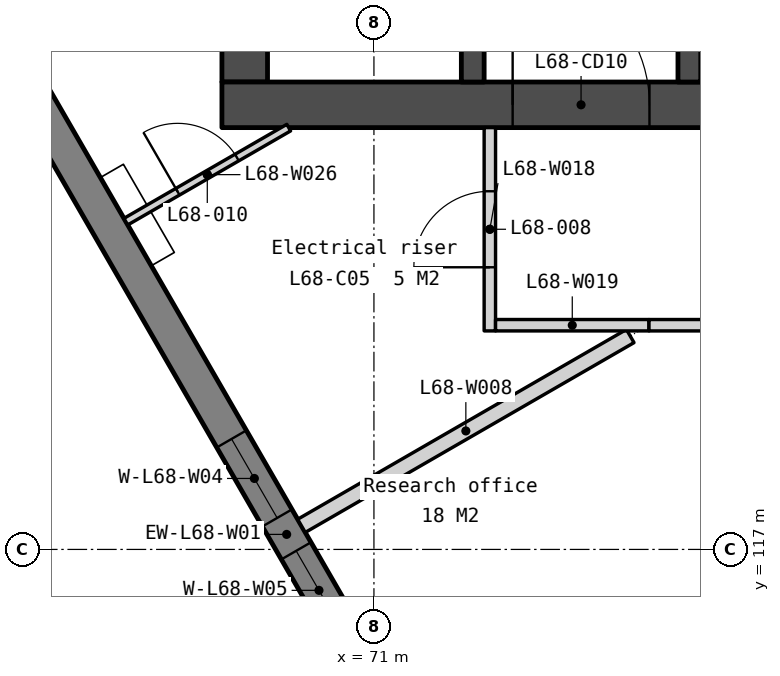
"""IFC4 building model, lengths in metres.
Left out: names, types, materials, properties, quantities, classifications, styles, units other than length and angle.
Written with IfcOpenShell. Run it as: python <this file> out.ifc"""

import sys

from ifc_helpers import new_model, si_unit, direction, frame, frame_2d, origin, place, context, subcontext, project, spatial, polyline, rectangle, outline, extrude, element, fill, save


model = new_model("IFC4")
c1 = context("Model", 3, precision=1e-05, world=origin(), true_north=direction((0.0, 1.0)))
c2 = subcontext(c1, "Body", "Model", "MODEL_VIEW")
j1 = project(units=[si_unit("LENGTHUNIT", "METRE"), si_unit("PLANEANGLEUNIT", "RADIAN")], contexts=[c1])
p1 = place(None, origin())
s1 = spatial("IfcSite", under=j1, at=p1, CompositionType="ELEMENT")
p2 = place(p1, origin())
s2 = spatial("IfcBuilding", under=s1, at=p2, CompositionType="ELEMENT")
p3 = place(p2, frame((0.0, 0.0, 277.7)))
s3 = spatial("IfcBuildingStorey", under=s2, at=p3, CompositionType="ELEMENT", Elevation=277.7)
p4 = place(p3, frame((69.3, 133.95, 0.0), z_axis=(0.0, 0.0, 1.0), x_axis=(0.0, -1.0, 0.0)))
e1 = element("IfcWall", 1, at=p4, inside=s3, PredefinedType="SOLIDWALL", context=c2, shape_type="SweptSolid", body=[
    extrude(rectangle(XDim=10.8, YDim=0.6, at=frame_2d((5.4, 0.0))), origin(), (0.0, 0.0, 1.0), 3.75),
])
p5 = place(p3, frame((69.0, 122.85, 0.0), z_axis=(0.0, 0.0, 1.0), x_axis=(1.0, 0.0, 0.0)))
e2 = element("IfcWall", 2, at=p5, inside=s3, PredefinedType="SOLIDWALL", context=c2, shape_type="SweptSolid", body=[
    extrude(rectangle(XDim=22.0, YDim=0.6, at=frame_2d((11.0, 0.0))), origin(), (0.0, 0.0, 1.0), 3.75),
])
p6 = place(p5, frame((16.375, 0.0, 0.0)))
e3 = element("IfcOpeningElement", 3, at=p6, cuts=e2, PredefinedType="OPENING", context=c2, shape_type="SweptSolid", body=[
    extrude(rectangle(XDim=1.8, YDim=2.1, at=frame_2d((0.9, 1.05))), frame((0.0, 0.31, 0.0), z_axis=(0.0, -1.0, 0.0), x_axis=(1.0, 0.0, 0.0)), (0.0, 0.0, 1.0), 0.62),
])
p7 = place(p5, frame((3.825, 0.0, 0.0)))
e4 = element("IfcOpeningElement", 4, at=p7, cuts=e2, PredefinedType="OPENING", context=c2, shape_type="SweptSolid", body=[
    extrude(rectangle(XDim=1.8, YDim=2.1, at=frame_2d((0.9, 1.05))), frame((0.0, 0.31, 0.0), z_axis=(0.0, -1.0, 0.0), x_axis=(1.0, 0.0, 0.0)), (0.0, 0.0, 1.0), 0.62),
])
p8 = place(p5, frame((12.85, 0.0, 0.0)))
e5 = element("IfcOpeningElement", 5, at=p8, cuts=e2, PredefinedType="OPENING", context=c2, shape_type="SweptSolid", body=[
    extrude(rectangle(XDim=1.5, YDim=2.1, at=frame_2d((0.75, 1.05))), frame((0.0, 0.31, 0.0), z_axis=(0.0, -1.0, 0.0), x_axis=(1.0, 0.0, 0.0)), (0.0, 0.0, 1.0), 0.62),
])
p9 = place(p3, frame((72.3, 133.95, 0.0), z_axis=(0.0, 0.0, 1.0), x_axis=(0.0, -1.0, 0.0)))
e6 = element("IfcWall", 6, at=p9, inside=s3, PredefinedType="SOLIDWALL", context=c2, shape_type="SweptSolid", body=[
    extrude(rectangle(XDim=10.8, YDim=0.3, at=frame_2d((5.4, 0.0))), origin(), (0.0, 0.0, 1.0), 3.75),
])
p10 = place(p9, frame((6.95, 0.0, 0.0)))
e7 = element("IfcOpeningElement", 7, at=p10, cuts=e6, PredefinedType="OPENING", context=c2, shape_type="SweptSolid", body=[
    extrude(rectangle(XDim=1.1, YDim=2.1, at=frame_2d((0.55, 1.05))), frame((0.0, 0.16, 0.0), z_axis=(0.0, -1.0, 0.0), x_axis=(1.0, 0.0, 0.0)), (0.0, 0.0, 1.0), 0.32),
])
p11 = place(p9, frame((9.35, 0.0, 0.0)))
e8 = element("IfcOpeningElement", 8, at=p11, cuts=e6, PredefinedType="OPENING", context=c2, shape_type="SweptSolid", body=[
    extrude(rectangle(XDim=0.9, YDim=2.1, at=frame_2d((0.45, 1.05))), frame((0.0, 0.16, 0.0), z_axis=(0.0, -1.0, 0.0), x_axis=(1.0, 0.0, 0.0)), (0.0, 0.0, 1.0), 0.32),
])
p12 = place(p9, frame((5.1, 0.0, 0.0)))
e9 = element("IfcOpeningElement", 9, at=p12, cuts=e6, PredefinedType="OPENING", context=c2, shape_type="SweptSolid", body=[
    extrude(rectangle(XDim=1.0, YDim=2.1, at=frame_2d((0.5, 1.05))), frame((0.0, 0.16, 0.0), z_axis=(0.0, -1.0, 0.0), x_axis=(1.0, 0.0, 0.0)), (0.0, 0.0, 1.0), 0.32),
])
p13 = place(p3, frame((75.15, 125.7, 0.0), z_axis=(0.0, 0.0, 1.0), x_axis=(0.0, -1.0, 0.0)))
e10 = element("IfcWall", 10, at=p13, inside=s3, PredefinedType="SOLIDWALL", context=c2, shape_type="SweptSolid", body=[
    extrude(rectangle(XDim=2.55, YDim=0.3, at=frame_2d((1.275, 0.0))), origin(), (0.0, 0.0, 1.0), 3.75),
])
p14 = place(p3, frame((60.609, 133.207, -0.15), z_axis=(0.0, 0.0, 1.0), x_axis=(0.500002536638, -0.866023939251, 0.0)))
e11 = element("IfcWall", 11, at=p14, inside=s3, PredefinedType="SOLIDWALL", context=c2, shape_type="SweptSolid", body=[
    extrude(outline(polyline([(36.972, 0.0), (36.972, 3.9), (0.0, 3.9), (0.0, 0.0), (36.972, 0.0)])), frame((0.0, 0.225, 0.0), z_axis=(0.0, -1.0, 0.0), x_axis=(1.0, 0.0, 0.0)), (0.0, 0.0, 1.0), 0.45),
])
p15 = place(p14, frame((0.744, 0.0, 0.95)))
e12 = element("IfcOpeningElement", 12, at=p15, cuts=e11, PredefinedType="OPENING", context=c2, shape_type="SweptSolid", body=[
    extrude(rectangle(XDim=1.2, YDim=2.2, at=frame_2d((0.6, 1.1))), frame((0.0, 0.235, 0.0), z_axis=(0.0, -1.0, 0.0), x_axis=(1.0, 0.0, 0.0)), (0.0, 0.0, 1.0), 0.47),
])
p16 = place(p14, frame((7.793, 0.0, 0.95)))
e13 = element("IfcOpeningElement", 13, at=p16, cuts=e11, PredefinedType="OPENING", context=c2, shape_type="SweptSolid", body=[
    extrude(rectangle(XDim=1.2, YDim=2.2, at=frame_2d((0.6, 1.1))), frame((0.0, 0.235, 0.0), z_axis=(0.0, -1.0, 0.0), x_axis=(1.0, 0.0, 0.0)), (0.0, 0.0, 1.0), 0.47),
])
p17 = place(p14, frame((9.493, 0.0, 0.95)))
e14 = element("IfcOpeningElement", 14, at=p17, cuts=e11, PredefinedType="OPENING", context=c2, shape_type="SweptSolid", body=[
    extrude(rectangle(XDim=1.2, YDim=2.2, at=frame_2d((0.6, 1.1))), frame((0.0, 0.235, 0.0), z_axis=(0.0, -1.0, 0.0), x_axis=(1.0, 0.0, 0.0)), (0.0, 0.0, 1.0), 0.47),
])
p18 = place(p14, frame((17.036, 0.0, 0.95)))
e15 = element("IfcOpeningElement", 15, at=p18, cuts=e11, PredefinedType="OPENING", context=c2, shape_type="SweptSolid", body=[
    extrude(rectangle(XDim=1.2, YDim=2.2, at=frame_2d((0.6, 1.1))), frame((0.0, 0.235, 0.0), z_axis=(0.0, -1.0, 0.0), x_axis=(1.0, 0.0, 0.0)), (0.0, 0.0, 1.0), 0.47),
])
p19 = place(p14, frame((18.736, 0.0, 0.95)))
e16 = element("IfcOpeningElement", 16, at=p19, cuts=e11, PredefinedType="OPENING", context=c2, shape_type="SweptSolid", body=[
    extrude(rectangle(XDim=1.2, YDim=2.2, at=frame_2d((0.6, 1.1))), frame((0.0, 0.235, 0.0), z_axis=(0.0, -1.0, 0.0), x_axis=(1.0, 0.0, 0.0)), (0.0, 0.0, 1.0), 0.47),
])
p20 = place(p14, frame((26.279, 0.0, 0.95)))
e17 = element("IfcOpeningElement", 17, at=p20, cuts=e11, PredefinedType="OPENING", context=c2, shape_type="SweptSolid", body=[
    extrude(rectangle(XDim=1.2, YDim=2.2, at=frame_2d((0.6, 1.1))), frame((0.0, 0.235, 0.0), z_axis=(0.0, -1.0, 0.0), x_axis=(1.0, 0.0, 0.0)), (0.0, 0.0, 1.0), 0.47),
])
p21 = place(p14, frame((27.979, 0.0, 0.95)))
e18 = element("IfcOpeningElement", 18, at=p21, cuts=e11, PredefinedType="OPENING", context=c2, shape_type="SweptSolid", body=[
    extrude(rectangle(XDim=1.2, YDim=2.2, at=frame_2d((0.6, 1.1))), frame((0.0, 0.235, 0.0), z_axis=(0.0, -1.0, 0.0), x_axis=(1.0, 0.0, 0.0)), (0.0, 0.0, 1.0), 0.47),
])
p22 = place(p14, frame((35.028, 0.0, 0.95)))
e19 = element("IfcOpeningElement", 19, at=p22, cuts=e11, PredefinedType="OPENING", context=c2, shape_type="SweptSolid", body=[
    extrude(rectangle(XDim=1.2, YDim=2.2, at=frame_2d((0.6, 1.1))), frame((0.0, 0.235, 0.0), z_axis=(0.0, -1.0, 0.0), x_axis=(1.0, 0.0, 0.0)), (0.0, 0.0, 1.0), 0.47),
])
p23 = place(p3, frame((70.047, 117.31, 0.0), z_axis=(0.0, 0.0, 1.0), x_axis=(0.866032544947, 0.499987630939, 0.0)))
e20 = element("IfcWall", 20, at=p23, inside=s3, PredefinedType="PARTITIONING", context=c2, shape_type="SweptSolid", body=[
    extrude(rectangle(XDim=4.994, YDim=0.2, at=frame_2d((2.497, 0.0))), origin(), (0.0, 0.0, 1.0), 3.75),
])
p24 = place(p3, frame((72.525, 119.875, 0.0), z_axis=(0.0, 0.0, 1.0), x_axis=(0.0, 1.0, 0.0)))
e21 = element("IfcWall", 21, at=p24, inside=s3, PredefinedType="PARTITIONING", context=c2, shape_type="SweptSolid", body=[
    extrude(rectangle(XDim=2.675, YDim=0.15, at=frame_2d((1.337, 0.0))), origin(), (0.0, 0.0, 1.0), 3.75),
])
p25 = place(p24, frame((0.837, 0.0, 0.0)))
e22 = element("IfcOpeningElement", 22, at=p25, cuts=e21, PredefinedType="OPENING", context=c2, shape_type="SweptSolid", body=[
    extrude(rectangle(XDim=1.0, YDim=2.1, at=frame_2d((0.5, 1.05))), frame((0.0, 0.085, 0.0), z_axis=(0.0, -1.0, 0.0), x_axis=(1.0, 0.0, 0.0)), (0.0, 0.0, 1.0), 0.17),
])
p26 = place(p3, frame((72.6, 119.95, 0.0), z_axis=(0.0, 0.0, 1.0), x_axis=(1.0, 0.0, 0.0)))
e23 = element("IfcWall", 23, at=p26, inside=s3, PredefinedType="PARTITIONING", context=c2, shape_type="SweptSolid", body=[
    extrude(rectangle(XDim=2.019, YDim=0.15, at=frame_2d((1.009, 0.0))), origin(), (0.0, 0.0, 1.0), 3.75),
])
p27 = place(p3, frame((74.619, 119.95, 0.0), z_axis=(0.0, 0.0, 1.0), x_axis=(1.0, 0.0, 0.0)))
e24 = element("IfcWall", 24, at=p27, inside=s3, PredefinedType="PARTITIONING", context=c2, shape_type="SweptSolid", body=[
    extrude(rectangle(XDim=6.581, YDim=0.15, at=frame_2d((3.291, 0.0))), origin(), (0.0, 0.0, 1.0), 3.75),
])
p28 = place(p27, frame((2.791, 0.0, 0.0)))
e25 = element("IfcOpeningElement", 25, at=p28, cuts=e24, PredefinedType="OPENING", context=c2, shape_type="SweptSolid", body=[
    extrude(rectangle(XDim=1.0, YDim=2.1, at=frame_2d((0.5, 1.05))), frame((0.0, 0.085, 0.0), z_axis=(0.0, -1.0, 0.0), x_axis=(1.0, 0.0, 0.0)), (0.0, 0.0, 1.0), 0.17),
])
p29 = place(p3, frame((67.736, 121.313, 0.0), z_axis=(0.0, 0.0, 1.0), x_axis=(0.86604923931, 0.499958713387, 0.0)))
e26 = element("IfcWall", 26, at=p29, inside=s3, PredefinedType="PARTITIONING", context=c2, shape_type="SweptSolid", body=[
    extrude(rectangle(XDim=2.475, YDim=0.1, at=frame_2d((1.237, 0.0))), origin(), (0.0, 0.0, 1.0), 3.75),
])
p30 = place(p29, frame((0.787, 0.0, 0.0)))
e27 = element("IfcOpeningElement", 27, at=p30, cuts=e26, PredefinedType="OPENING", context=c2, shape_type="SweptSolid", body=[
    extrude(rectangle(XDim=0.9, YDim=2.1, at=frame_2d((0.45, 1.05))), frame((0.0, 0.06, 0.0), z_axis=(0.0, -1.0, 0.0), x_axis=(1.0, 0.0, 0.0)), (0.0, 0.0, 1.0), 0.12),
])
p31 = place(p7, origin())
e28 = element("IfcDoor", 28, at=p31, inside=s3, OperationType="DOUBLE_DOOR_DOUBLE_SWING", PredefinedType="DOOR", context=c2, shape_type="SweptSolid", body=[
    extrude(rectangle(XDim=1.8, YDim=2.1, at=frame_2d((0.9, 1.05))), frame((0.0, 0.025, 0.0), z_axis=(0.0, -1.0, 0.0), x_axis=(1.0, 0.0, 0.0)), (0.0, 0.0, 1.0), 0.05),
])
fill(e4, e28)
p32 = place(p18, origin())
e29 = element("IfcWindow", 29, at=p32, inside=s3, PartitioningType="SINGLE_PANEL", PredefinedType="WINDOW", context=c2, shape_type="SweptSolid", body=[
    extrude(rectangle(XDim=1.2, YDim=2.2, at=frame_2d((0.6, 1.1))), frame((0.0, 0.03, 0.0), z_axis=(0.0, -1.0, 0.0), x_axis=(1.0, 0.0, 0.0)), (0.0, 0.0, 1.0), 0.06),
])
fill(e15, e29)
p33 = place(p19, origin())
e30 = element("IfcWindow", 30, at=p33, inside=s3, PartitioningType="SINGLE_PANEL", PredefinedType="WINDOW", context=c2, shape_type="SweptSolid", body=[
    extrude(rectangle(XDim=1.2, YDim=2.2, at=frame_2d((0.6, 1.1))), frame((0.0, 0.03, 0.0), z_axis=(0.0, -1.0, 0.0), x_axis=(1.0, 0.0, 0.0)), (0.0, 0.0, 1.0), 0.06),
])
fill(e16, e30)
p34 = place(p25, origin())
e31 = element("IfcDoor", 31, at=p34, inside=s3, OperationType="SINGLE_SWING_LEFT", PredefinedType="DOOR", context=c2, shape_type="SweptSolid", body=[
    extrude(rectangle(XDim=1.0, YDim=2.1, at=frame_2d((0.5, 1.05))), frame((0.0, 0.025, 0.0), z_axis=(0.0, -1.0, 0.0), x_axis=(1.0, 0.0, 0.0)), (0.0, 0.0, 1.0), 0.05),
])
fill(e22, e31)
p35 = place(p30, origin())
e32 = element("IfcDoor", 32, at=p35, inside=s3, OperationType="SINGLE_SWING_LEFT", PredefinedType="DOOR", context=c2, shape_type="SweptSolid", body=[
    extrude(rectangle(XDim=0.9, YDim=2.1, at=frame_2d((0.45, 1.05))), frame((0.0, 0.025, 0.0), z_axis=(0.0, -1.0, 0.0), x_axis=(1.0, 0.0, 0.0)), (0.0, 0.0, 1.0), 0.05),
])
fill(e27, e32)
save(model, sys.argv[1])
